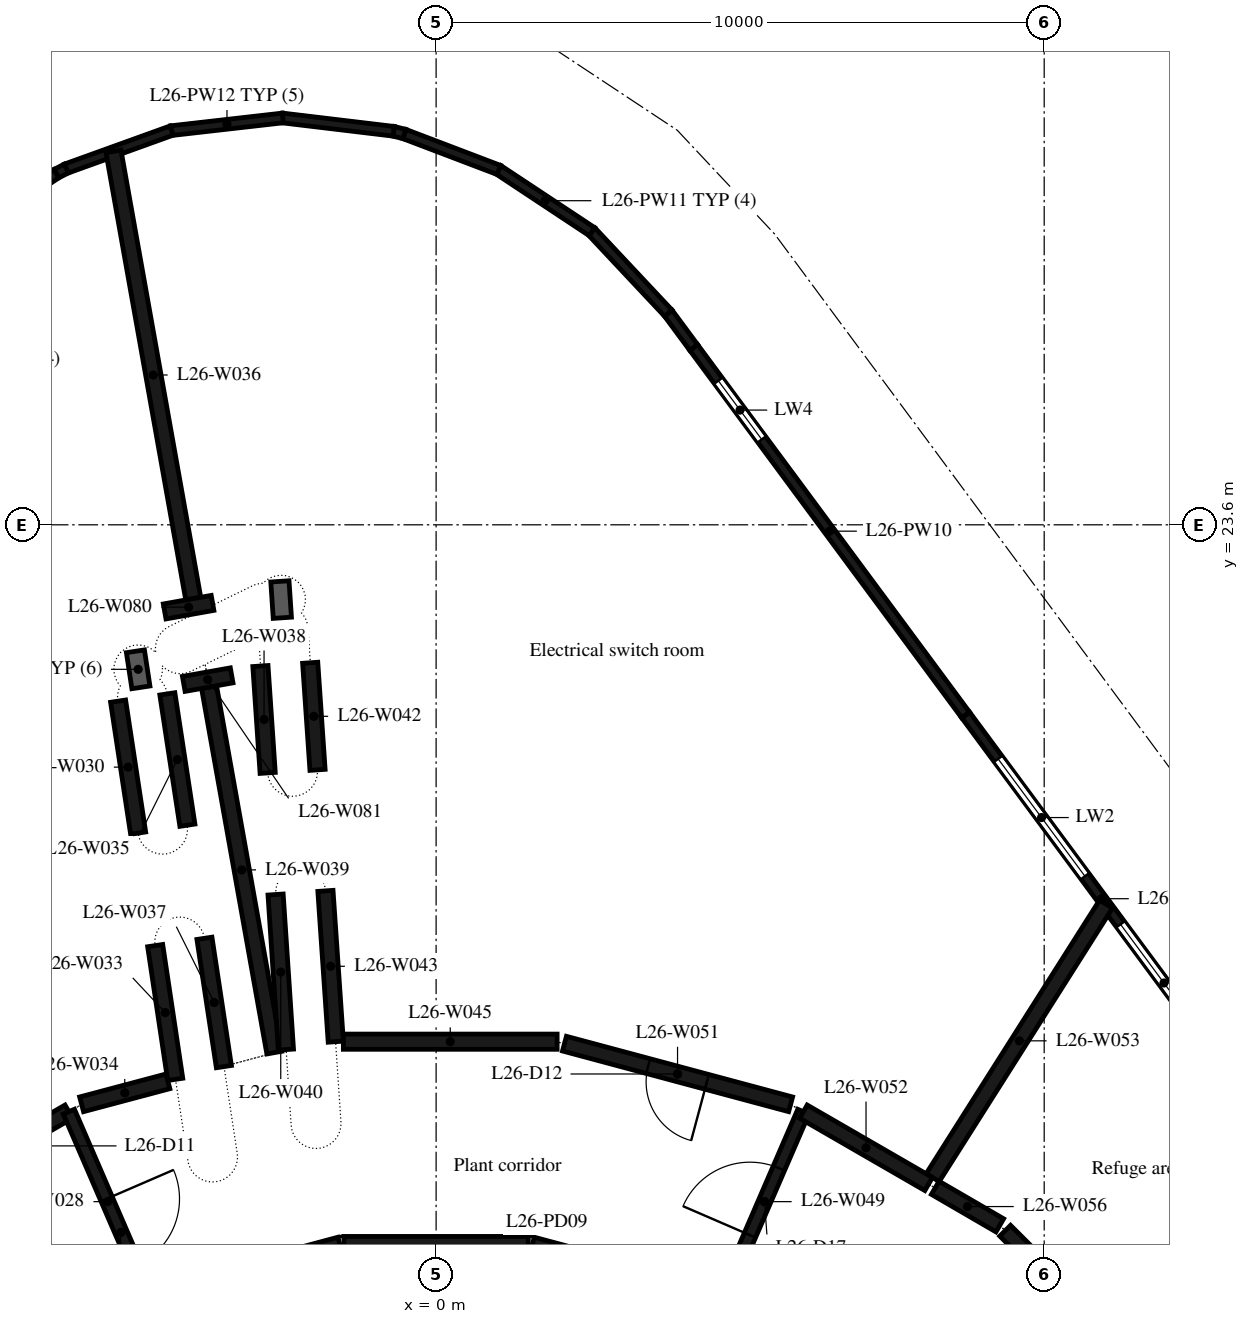
"""IFC4 building model, lengths in metres.
Left out: names, types, materials, properties, quantities, classifications, styles, units other than length and angle.
Written with IfcOpenShell. Run it as: python <this file> out.ifc"""

import sys

from ifc_helpers import new_model, si_unit, direction, frame, frame_2d, origin, place, context, subcontext, project, spatial, rectangle, extrude, element, fill, save


model = new_model("IFC4")
c1 = context("Model", 3, precision=1e-05, world=origin(), true_north=direction((0.0, 1.0)))
c2 = subcontext(c1, "Body", "Model", "MODEL_VIEW")
j1 = project(units=[si_unit("LENGTHUNIT", "METRE"), si_unit("PLANEANGLEUNIT", "RADIAN")], contexts=[c1])
p1 = place(None, origin())
s1 = spatial("IfcSite", under=j1, at=p1, CompositionType="ELEMENT")
p2 = place(p1, origin())
s2 = spatial("IfcBuilding", under=s1, at=p2, CompositionType="ELEMENT")
p3 = place(p2, frame((0.0, 0.0, 108.2)))
s3 = spatial("IfcBuildingStorey", under=s2, at=p3, CompositionType="ELEMENT", Elevation=108.2)
p4 = place(p3, frame((13.18, 14.429, 0.0), z_axis=(0.0, 0.0, 1.0), x_axis=(-0.594797265235, 0.803875744919, 0.0)))
e1 = element("IfcWall", 1, at=p4, inside=s3, PredefinedType="STANDARD", context=c2, shape_type="SweptSolid", body=[
    extrude(rectangle(XDim=7.519, YDim=0.16, at=frame_2d((3.759, 0.0))), origin(), (0.0, 0.0, 1.0), 4.75),
])
p5 = place(p4, frame((0.835, 0.0, 1.0)))
e2 = element("IfcOpeningElement", 2, at=p5, cuts=e1, PredefinedType="OPENING", context=c2, shape_type="SweptSolid", body=[
    extrude(rectangle(XDim=2.4, YDim=2.2, at=frame_2d((1.2, 1.1))), frame((0.0, 0.09, 0.0), z_axis=(0.0, -1.0, 0.0), x_axis=(1.0, 0.0, 0.0)), (0.0, 0.0, 1.0), 0.18),
])
p6 = place(p4, frame((4.219, 0.0, 1.0)))
e3 = element("IfcOpeningElement", 3, at=p6, cuts=e1, PredefinedType="OPENING", context=c2, shape_type="SweptSolid", body=[
    extrude(rectangle(XDim=2.4, YDim=2.2, at=frame_2d((1.2, 1.1))), frame((0.0, 0.09, 0.0), z_axis=(0.0, -1.0, 0.0), x_axis=(1.0, 0.0, 0.0)), (0.0, 0.0, 1.0), 0.18),
])
p7 = place(p3, frame((8.708, 20.473, 0.0), z_axis=(0.0, 0.0, 1.0), x_axis=(-0.594833773541, 0.803848730704, 0.0)))
e4 = element("IfcWall", 4, at=p7, inside=s3, PredefinedType="STANDARD", context=c2, shape_type="SweptSolid", body=[
    extrude(rectangle(XDim=7.519, YDim=0.16, at=frame_2d((3.759, 0.0))), origin(), (0.0, 0.0, 1.0), 4.75),
])
p8 = place(p7, frame((5.637, 0.0, 1.0)))
e5 = element("IfcOpeningElement", 5, at=p8, cuts=e4, PredefinedType="OPENING", context=c2, shape_type="SweptSolid", body=[
    extrude(rectangle(XDim=1.2, YDim=2.2, at=frame_2d((0.6, 1.1))), frame((0.0, 0.09, 0.0), z_axis=(0.0, -1.0, 0.0), x_axis=(1.0, 0.0, 0.0)), (0.0, 0.0, 1.0), 0.18),
])
p9 = place(p3, frame((4.235, 26.517, 0.0), z_axis=(0.0, 0.0, 1.0), x_axis=(-0.594771293471, 0.803894961088, 0.0)))
e6 = element("IfcWall", 6, at=p9, inside=s3, PredefinedType="STANDARD", context=c2, shape_type="SweptSolid", body=[
    extrude(rectangle(XDim=0.704, YDim=0.16, at=frame_2d((0.352, 0.0))), origin(), (0.0, 0.0, 1.0), 4.75),
])
p10 = place(p3, frame((3.819, 27.08, 0.0), z_axis=(0.0, 0.0, 1.0), x_axis=(-0.684130270413, 0.729359837875, 0.0)))
e7 = element("IfcWall", 7, at=p10, inside=s3, PredefinedType="STANDARD", context=c2, shape_type="SweptSolid", body=[
    extrude(rectangle(XDim=1.846, YDim=0.16, at=frame_2d((0.923, 0.0))), origin(), (0.0, 0.0, 1.0), 4.75),
])
p11 = place(p3, frame((2.564, 28.42, 0.0), z_axis=(0.0, 0.0, 1.0), x_axis=(-0.833874978311, 0.55195336809, 0.0)))
e8 = element("IfcWall", 8, at=p11, inside=s3, PredefinedType="STANDARD", context=c2, shape_type="SweptSolid", body=[
    extrude(rectangle(XDim=1.848, YDim=0.16, at=frame_2d((0.924, 0.0))), origin(), (0.0, 0.0, 1.0), 4.75),
])
p12 = place(p3, frame((1.031, 29.436, 0.0), z_axis=(0.0, 0.0, 1.0), x_axis=(-0.934627342033, 0.355628642723, 0.0)))
e9 = element("IfcWall", 9, at=p12, inside=s3, PredefinedType="STANDARD", context=c2, shape_type="SweptSolid", body=[
    extrude(rectangle(XDim=1.661, YDim=0.16, at=frame_2d((0.831, 0.0))), origin(), (0.0, 0.0, 1.0), 4.75),
])
p13 = place(p3, frame((-0.522, 30.027, 0.0), z_axis=(0.0, 0.0, 1.0), x_axis=(-0.969676988372, 0.244390135281, 0.0)))
e10 = element("IfcWall", 10, at=p13, inside=s3, PredefinedType="STANDARD", context=c2, shape_type="SweptSolid", body=[
    extrude(rectangle(XDim=0.186, YDim=0.16, at=frame_2d((0.093, 0.0))), origin(), (0.0, 0.0, 1.0), 4.75),
])
p14 = place(p3, frame((-0.697, 30.071, 0.0), z_axis=(0.0, 0.0, 1.0), x_axis=(-0.992909337367, 0.118874083672, 0.0)))
e11 = element("IfcWall", 11, at=p14, inside=s3, PredefinedType="STANDARD", context=c2, shape_type="SweptSolid", body=[
    extrude(rectangle(XDim=1.846, YDim=0.16, at=frame_2d((0.923, 0.0))), origin(), (0.0, 0.0, 1.0), 4.75),
])
p15 = place(p3, frame((-2.521, 30.291, 0.0), z_axis=(0.0, 0.0, 1.0), x_axis=(-0.99357220697, -0.113200130467, 0.0)))
e12 = element("IfcWall", 12, at=p15, inside=s3, PredefinedType="STANDARD", context=c2, shape_type="SweptSolid", body=[
    extrude(rectangle(XDim=1.848, YDim=0.16, at=frame_2d((0.924, 0.0))), origin(), (0.0, 0.0, 1.0), 4.75),
])
p16 = place(p3, frame((-4.348, 30.084, 0.0), z_axis=(0.0, 0.0, 1.0), x_axis=(-0.940678213267, -0.339300013388, 0.0)))
e13 = element("IfcWall", 13, at=p16, inside=s3, PredefinedType="STANDARD", context=c2, shape_type="SweptSolid", body=[
    extrude(rectangle(XDim=1.846, YDim=0.16, at=frame_2d((0.923, 0.0))), origin(), (0.0, 0.0, 1.0), 4.75),
])
p17 = place(p3, frame((-6.08, 29.459, 0.0), z_axis=(0.0, 0.0, 1.0), x_axis=(-0.889653469116, -0.456636293882, 0.0)))
e14 = element("IfcWall", 14, at=p17, inside=s3, PredefinedType="STANDARD", context=c2, shape_type="SweptSolid", body=[
    extrude(rectangle(XDim=0.186, YDim=0.16, at=frame_2d((0.093, 0.0))), origin(), (0.0, 0.0, 1.0), 4.75),
])
p18 = place(p3, frame((-6.246, 29.375, 0.0), z_axis=(0.0, 0.0, 1.0), x_axis=(-0.830691132327, -0.556733547285, 0.0)))
e15 = element("IfcWall", 15, at=p18, inside=s3, PredefinedType="STANDARD", context=c2, shape_type="SweptSolid", body=[
    extrude(rectangle(XDim=1.661, YDim=0.16, at=frame_2d((0.831, 0.0))), origin(), (0.0, 0.0, 1.0), 4.75),
])
p19 = place(p3, frame((4.479, 10.858, 0.0), z_axis=(0.0, 0.0, 1.0), x_axis=(-0.965948410781, 0.258734743916, 0.0)))
e16 = element("IfcWall", 16, at=p19, inside=s3, PredefinedType="SHEAR", context=c2, shape_type="SweptSolid", body=[
    extrude(rectangle(XDim=3.033, YDim=0.5, at=frame_2d((1.516, 0.0))), origin(), (0.0, 0.0, 1.0), 4.75),
])
p20 = place(p19, frame((1.016, 0.0, 0.0)))
e17 = element("IfcOpeningElement", 17, at=p20, cuts=e16, PredefinedType="OPENING", context=c2, shape_type="SweptSolid", body=[
    extrude(rectangle(XDim=1.0, YDim=2.4, at=frame_2d((0.5, 1.2))), frame((0.0, 0.26, 0.0), z_axis=(0.0, -1.0, 0.0), x_axis=(1.0, 0.0, 0.0)), (0.0, 0.0, 1.0), 0.52),
])
for number, where, z_axis, x_axis in (
    (18, (1.516, 11.647, 0.0), (0.0, 0.0, 1.0), (-1.0, 0.0, 0.0)),
    (19, (-1.55, 11.643, 0.0), (0.0, 0.0, 1.0), (-0.966, -0.259, 0.0)),
):
    element("IfcWall", number, at=place(p3, frame(where, z_axis=z_axis, x_axis=x_axis)), inside=s3, PredefinedType="SHEAR", context=c2, shape_type="SweptSolid", body=[
        extrude(rectangle(XDim=3.033, YDim=0.5, at=frame_2d((1.516, 0.0))), origin(), (0.0, 0.0, 1.0), 4.75),
    ])
p21 = place(p3, frame((-7.992, 12.823, 0.0), z_axis=(0.0, 0.0, 1.0), x_axis=(0.865900522319, 0.500216238688, 0.0)))
e20 = element("IfcWall", 20, at=p21, inside=s3, PredefinedType="PARTITIONING", context=c2, shape_type="SweptSolid", body=[
    extrude(rectangle(XDim=2.254, YDim=0.25, at=frame_2d((1.127, 0.0))), origin(), (0.0, 0.0, 1.0), 4.75),
])
p22 = place(p21, frame((0.627, 0.0, 0.0)))
e21 = element("IfcOpeningElement", 21, at=p22, cuts=e20, PredefinedType="OPENING", context=c2, shape_type="SweptSolid", body=[
    extrude(rectangle(XDim=1.0, YDim=2.1, at=frame_2d((0.5, 1.05))), frame((0.0, 0.135, 0.0), z_axis=(0.0, -1.0, 0.0), x_axis=(1.0, 0.0, 0.0)), (0.0, 0.0, 1.0), 0.27),
])
p23 = place(p3, frame((-6.04, 13.949, 0.0), z_axis=(0.0, 0.0, 1.0), x_axis=(0.396905977672, -0.917859272922, 0.0)))
e22 = element("IfcWall", 22, at=p23, inside=s3, PredefinedType="PARTITIONING", context=c2, shape_type="SweptSolid", body=[
    extrude(rectangle(XDim=3.224, YDim=0.2, at=frame_2d((1.612, 0.0))), origin(), (0.0, 0.0, 1.0), 4.75),
])
p24 = place(p23, frame((1.562, 0.0, 0.0)))
e23 = element("IfcOpeningElement", 23, at=p24, cuts=e22, PredefinedType="OPENING", context=c2, shape_type="SweptSolid", body=[
    extrude(rectangle(XDim=1.2, YDim=2.1, at=frame_2d((0.6, 1.05))), frame((0.0, 0.11, 0.0), z_axis=(0.0, -1.0, 0.0), x_axis=(1.0, 0.0, 0.0)), (0.0, 0.0, 1.0), 0.22),
])
p25 = place(p3, frame((-5.23, 20.7, 0.0), z_axis=(0.0, 0.0, 1.0), x_axis=(0.150385276272, -0.988627467088, 0.0)))
e24 = element("IfcWall", 24, at=p25, inside=s3, PredefinedType="PARTITIONING", context=c2, shape_type="SweptSolid", body=[
    extrude(rectangle(XDim=2.195, YDim=0.25, at=frame_2d((1.097, 0.0))), origin(), (0.0, 0.0, 1.0), 4.75),
])
p26 = place(p3, frame((-4.62, 16.68, 0.0), z_axis=(0.0, 0.0, 1.0), x_axis=(0.148378019052, -0.98893071722, 0.0)))
e25 = element("IfcWall", 25, at=p26, inside=s3, PredefinedType="PARTITIONING", context=c2, shape_type="SweptSolid", body=[
    extrude(rectangle(XDim=2.225, YDim=0.25, at=frame_2d((1.112, 0.0))), origin(), (0.0, 0.0, 1.0), 4.75),
])
p27 = place(p3, frame((-4.411, 14.448, 0.0), z_axis=(0.0, 0.0, 1.0), x_axis=(-0.966364499744, -0.257176308464, 0.0)))
e26 = element("IfcWall", 26, at=p27, inside=s3, PredefinedType="PARTITIONING", context=c2, shape_type="SweptSolid", body=[
    extrude(rectangle(XDim=1.469, YDim=0.25, at=frame_2d((0.734, 0.0))), origin(), (0.0, 0.0, 1.0), 4.75),
])
p28 = place(p3, frame((-4.09, 18.66, 0.0), z_axis=(0.0, 0.0, 1.0), x_axis=(-0.150940482968, 0.988542852183, 0.0)))
e27 = element("IfcWall", 27, at=p28, inside=s3, PredefinedType="PARTITIONING", context=c2, shape_type="SweptSolid", body=[
    extrude(rectangle(XDim=2.185, YDim=0.25, at=frame_2d((1.093, 0.0))), origin(), (0.0, 0.0, 1.0), 4.75),
])
p29 = place(p3, frame((-3.994, 22.386, 0.0), z_axis=(0.0, 0.0, 1.0), x_axis=(-0.17561193624, 0.984459469887, 0.0)))
e28 = element("IfcWall", 28, at=p29, inside=s3, PredefinedType="PARTITIONING", context=c2, shape_type="SweptSolid", body=[
    extrude(rectangle(XDim=7.471, YDim=0.25, at=frame_2d((3.736, 0.0))), origin(), (0.0, 0.0, 1.0), 4.75),
])
p30 = place(p3, frame((-3.49, 14.69, 0.0), z_axis=(0.0, 0.0, 1.0), x_axis=(-0.149968031865, 0.98869084623, 0.0)))
e29 = element("IfcWall", 29, at=p30, inside=s3, PredefinedType="PARTITIONING", context=c2, shape_type="SweptSolid", body=[
    extrude(rectangle(XDim=2.134, YDim=0.25, at=frame_2d((1.067, 0.0))), origin(), (0.0, 0.0, 1.0), 4.75),
])
p31 = place(p3, frame((-2.889, 21.278, 0.0), z_axis=(0.0, 0.0, 1.0), x_axis=(0.067769937047, -0.997700975058, 0.0)))
e30 = element("IfcWall", 30, at=p31, inside=s3, PredefinedType="PARTITIONING", context=c2, shape_type="SweptSolid", body=[
    extrude(rectangle(XDim=1.762, YDim=0.25, at=frame_2d((0.881, 0.0))), origin(), (0.0, 0.0, 1.0), 4.75),
])
p32 = place(p3, frame((-2.66, 14.92, 0.0), z_axis=(0.0, 0.0, 1.0), x_axis=(-0.175922099098, 0.984404091341, 0.0)))
e31 = element("IfcWall", 31, at=p32, inside=s3, PredefinedType="PARTITIONING", context=c2, shape_type="SweptSolid", body=[
    extrude(rectangle(XDim=6.106, YDim=0.25, at=frame_2d((3.053, 0.0))), origin(), (0.0, 0.0, 1.0), 4.75),
])
p33 = place(p3, frame((-2.64, 17.52, 0.0), z_axis=(0.0, 0.0, 1.0), x_axis=(0.066487308806, -0.997787270799, 0.0)))
e32 = element("IfcWall", 32, at=p33, inside=s3, PredefinedType="PARTITIONING", context=c2, shape_type="SweptSolid", body=[
    extrude(rectangle(XDim=2.556, YDim=0.25, at=frame_2d((1.278, 0.0))), origin(), (0.0, 0.0, 1.0), 4.75),
])
p34 = place(p3, frame((-1.95, 19.57, 0.0), z_axis=(0.0, 0.0, 1.0), x_axis=(-0.068455615556, 0.997654162873, 0.0)))
e33 = element("IfcWall", 33, at=p34, inside=s3, PredefinedType="PARTITIONING", context=c2, shape_type="SweptSolid", body=[
    extrude(rectangle(XDim=1.765, YDim=0.25, at=frame_2d((0.883, 0.0))), origin(), (0.0, 0.0, 1.0), 4.75),
])
p35 = place(p3, frame((-1.65, 15.1, 0.0), z_axis=(0.0, 0.0, 1.0), x_axis=(-0.06845491093, 0.997654211222, 0.0)))
e34 = element("IfcWall", 34, at=p35, inside=s3, PredefinedType="PARTITIONING", context=c2, shape_type="SweptSolid", body=[
    extrude(rectangle(XDim=2.486, YDim=0.25, at=frame_2d((1.243, 0.0))), origin(), (0.0, 0.0, 1.0), 4.75),
])
p36 = place(p3, frame((1.99, 15.1, 0.0), z_axis=(0.0, 0.0, 1.0), x_axis=(-1.0, 0.0, 0.0)))
e35 = element("IfcWall", 35, at=p36, inside=s3, PredefinedType="PARTITIONING", context=c2, shape_type="SweptSolid", body=[
    extrude(rectangle(XDim=3.515, YDim=0.25, at=frame_2d((1.757, 0.0))), origin(), (0.0, 0.0, 1.0), 4.75),
])
p37 = place(p3, frame((4.76, 10.99, 0.0), z_axis=(0.0, 0.0, 1.0), x_axis=(0.396905977672, 0.917859272922, 0.0)))
e36 = element("IfcWall", 36, at=p37, inside=s3, PredefinedType="PARTITIONING", context=c2, shape_type="SweptSolid", body=[
    extrude(rectangle(XDim=3.224, YDim=0.2, at=frame_2d((1.612, 0.0))), origin(), (0.0, 0.0, 1.0), 4.75),
])
p38 = place(p37, frame((1.012, 0.0, 0.0)))
e37 = element("IfcOpeningElement", 37, at=p38, cuts=e36, PredefinedType="OPENING", context=c2, shape_type="SweptSolid", body=[
    extrude(rectangle(XDim=1.2, YDim=2.1, at=frame_2d((0.6, 1.05))), frame((0.0, 0.11, 0.0), z_axis=(0.0, -1.0, 0.0), x_axis=(1.0, 0.0, 0.0)), (0.0, 0.0, 1.0), 0.22),
])
p39 = place(p3, frame((5.83, 14.07, 0.0), z_axis=(0.0, 0.0, 1.0), x_axis=(-0.965861411942, 0.259059323171, 0.0)))
e38 = element("IfcWall", 38, at=p39, inside=s3, PredefinedType="PARTITIONING", context=c2, shape_type="SweptSolid", body=[
    extrude(rectangle(XDim=3.851, YDim=0.25, at=frame_2d((1.925, 0.0))), origin(), (0.0, 0.0, 1.0), 4.75),
])
p40 = place(p39, frame((1.425, 0.0, 0.0)))
e39 = element("IfcOpeningElement", 39, at=p40, cuts=e38, PredefinedType="OPENING", context=c2, shape_type="SweptSolid", body=[
    extrude(rectangle(XDim=1.0, YDim=2.1, at=frame_2d((0.5, 1.05))), frame((0.0, 0.135, 0.0), z_axis=(0.0, -1.0, 0.0), x_axis=(1.0, 0.0, 0.0)), (0.0, 0.0, 1.0), 0.27),
])
p41 = place(p3, frame((6.04, 13.95, 0.0), z_axis=(0.0, 0.0, 1.0), x_axis=(0.865922362496, -0.500178430292, 0.0)))
e40 = element("IfcWall", 40, at=p41, inside=s3, PredefinedType="PARTITIONING", context=c2, shape_type="SweptSolid", body=[
    extrude(rectangle(XDim=2.379, YDim=0.25, at=frame_2d((1.189, 0.0))), origin(), (0.0, 0.0, 1.0), 4.75),
])
p42 = place(p3, frame((8.167, 12.865, 0.0), z_axis=(0.0, 0.0, 1.0), x_axis=(0.535313877542, 0.84465321435, 0.0)))
e41 = element("IfcWall", 41, at=p42, inside=s3, PredefinedType="PARTITIONING", context=c2, shape_type="SweptSolid", body=[
    extrude(rectangle(XDim=5.324, YDim=0.25, at=frame_2d((2.662, 0.0))), origin(), (0.0, 0.0, 1.0), 4.75),
])
p43 = place(p3, frame((9.27, 12.08, 0.0), z_axis=(0.0, 0.0, 1.0), x_axis=(-0.864599561852, 0.502461538474, 0.0)))
e42 = element("IfcWall", 42, at=p43, inside=s3, PredefinedType="PARTITIONING", context=c2, shape_type="SweptSolid", body=[
    extrude(rectangle(XDim=1.228, YDim=0.25, at=frame_2d((0.614, 0.0))), origin(), (0.0, 0.0, 1.0), 4.75),
])
p44 = place(p3, frame((12.08, 9.27, 0.0), z_axis=(0.0, 0.0, 1.0), x_axis=(-0.707106781187, 0.707106781187, 0.0)))
e43 = element("IfcWall", 43, at=p44, inside=s3, PredefinedType="PARTITIONING", context=c2, shape_type="SweptSolid", body=[
    extrude(rectangle(XDim=3.849, YDim=0.25, at=frame_2d((1.925, 0.0))), origin(), (0.0, 0.0, 1.0), 4.75),
])
p45 = place(p44, frame((1.425, 0.0, 0.0)))
e44 = element("IfcOpeningElement", 44, at=p45, cuts=e43, PredefinedType="OPENING", context=c2, shape_type="SweptSolid", body=[
    extrude(rectangle(XDim=1.0, YDim=2.1, at=frame_2d((0.5, 1.05))), frame((0.0, 0.135, 0.0), z_axis=(0.0, -1.0, 0.0), x_axis=(1.0, 0.0, 0.0)), (0.0, 0.0, 1.0), 0.27),
])
for number, where, z_axis, x_axis in (
    (45, (-4.464, 22.175, 0.0), (0.0, 0.0, 1.0), (0.984, 0.175, 0.0)),
    (46, (-3.362, 21.124, 0.0), (0.0, 0.0, 1.0), (-0.984, -0.176, 0.0)),
):
    element("IfcWall", number, at=place(p3, frame(where, z_axis=z_axis, x_axis=x_axis)), inside=s3, PredefinedType="PARTITIONING", context=c2, shape_type="SweptSolid", body=[
        extrude(rectangle(XDim=0.8, YDim=0.25, at=frame_2d((0.4, 0.0))), origin(), (0.0, 0.0, 1.0), 4.75),
    ])
p46 = place(p5, origin())
e47 = element("IfcWindow", 47, at=p46, inside=s3, PartitioningType="SINGLE_PANEL", PredefinedType="WINDOW", context=c2, shape_type="SweptSolid", body=[
    extrude(rectangle(XDim=2.4, YDim=2.2, at=frame_2d((1.2, 1.1))), frame((0.0, 0.03, 0.0), z_axis=(0.0, -1.0, 0.0), x_axis=(1.0, 0.0, 0.0)), (0.0, 0.0, 1.0), 0.06),
])
fill(e2, e47)
p47 = place(p6, origin())
e48 = element("IfcWindow", 48, at=p47, inside=s3, PartitioningType="SINGLE_PANEL", PredefinedType="WINDOW", context=c2, shape_type="SweptSolid", body=[
    extrude(rectangle(XDim=2.4, YDim=2.2, at=frame_2d((1.2, 1.1))), frame((0.0, 0.03, 0.0), z_axis=(0.0, -1.0, 0.0), x_axis=(1.0, 0.0, 0.0)), (0.0, 0.0, 1.0), 0.06),
])
fill(e3, e48)
p48 = place(p8, origin())
e49 = element("IfcWindow", 49, at=p48, inside=s3, PartitioningType="SINGLE_PANEL", PredefinedType="WINDOW", context=c2, shape_type="SweptSolid", body=[
    extrude(rectangle(XDim=1.2, YDim=2.2, at=frame_2d((0.6, 1.1))), frame((0.0, 0.03, 0.0), z_axis=(0.0, -1.0, 0.0), x_axis=(1.0, 0.0, 0.0)), (0.0, 0.0, 1.0), 0.06),
])
fill(e5, e49)
p49 = place(p40, origin())
e50 = element("IfcDoor", 50, at=p49, inside=s3, OperationType="SINGLE_SWING_LEFT", PredefinedType="DOOR", context=c2, shape_type="SweptSolid", body=[
    extrude(rectangle(XDim=1.0, YDim=2.1, at=frame_2d((0.5, 1.05))), frame((0.0, 0.025, 0.0), z_axis=(0.0, -1.0, 0.0), x_axis=(1.0, 0.0, 0.0)), (0.0, 0.0, 1.0), 0.05),
])
fill(e39, e50)
p50 = place(p24, origin())
e51 = element("IfcDoor", 51, at=p50, inside=s3, OperationType="SINGLE_SWING_LEFT", PredefinedType="DOOR", context=c2, shape_type="SweptSolid", body=[
    extrude(rectangle(XDim=1.2, YDim=2.1, at=frame_2d((0.6, 1.05))), frame((0.0, 0.025, 0.0), z_axis=(0.0, -1.0, 0.0), x_axis=(1.0, 0.0, 0.0)), (0.0, 0.0, 1.0), 0.05),
])
fill(e23, e51)
p51 = place(p38, origin())
e52 = element("IfcDoor", 52, at=p51, inside=s3, OperationType="SINGLE_SWING_LEFT", PredefinedType="DOOR", context=c2, shape_type="SweptSolid", body=[
    extrude(rectangle(XDim=1.2, YDim=2.1, at=frame_2d((0.6, 1.05))), frame((0.0, 0.025, 0.0), z_axis=(0.0, -1.0, 0.0), x_axis=(1.0, 0.0, 0.0)), (0.0, 0.0, 1.0), 0.05),
])
fill(e37, e52)
save(model, sys.argv[1])
